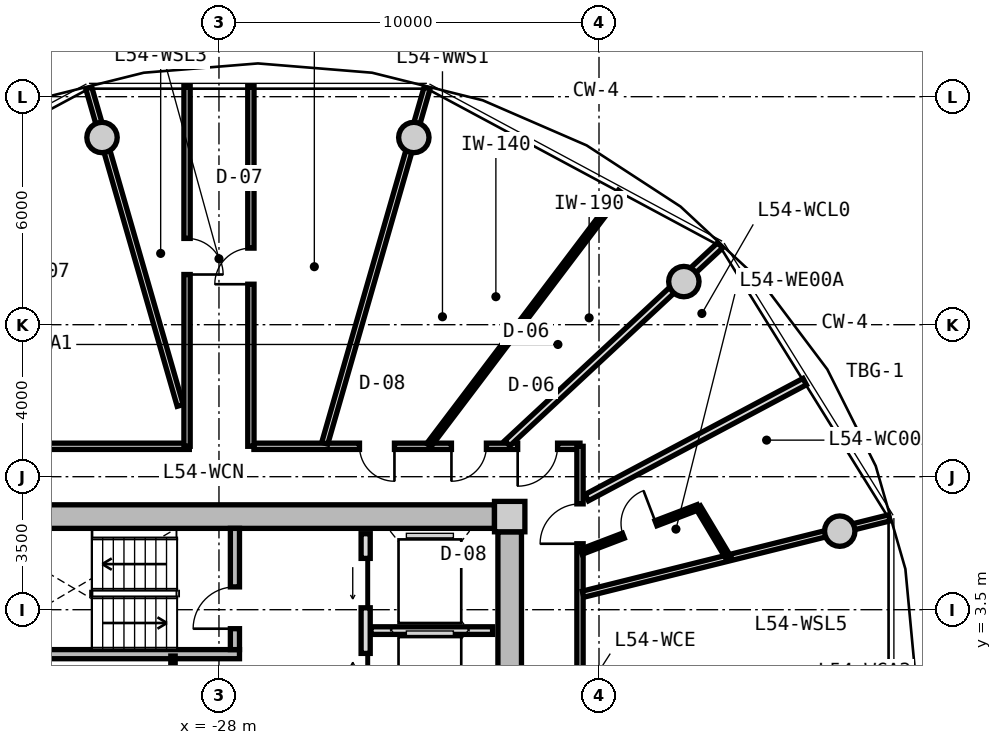
"""IFC4 building model, lengths in metres.
Left out: names, types, materials, properties, quantities, classifications, styles, units other than length and angle.
Written with IfcOpenShell. Run it as: python <this file> out.ifc"""

import sys

from ifc_helpers import new_model, si_unit, direction, frame, frame_2d, origin, origin_2d, place, context, subcontext, project, spatial, rectangle, circle, extrude, source, transform, mapped, element, fill, save


model = new_model("IFC4")
c1 = context("Model", 3, precision=1e-05, world=origin(), true_north=direction((0.0, 1.0)))
c2 = subcontext(c1, "Body", "Model", "MODEL_VIEW")
j1 = project(units=[si_unit("LENGTHUNIT", "METRE"), si_unit("PLANEANGLEUNIT", "RADIAN")], contexts=[c1])
p1 = place(None, origin())
s1 = spatial("IfcSite", under=j1, at=p1, CompositionType="ELEMENT")
p2 = place(p1, origin())
s2 = spatial("IfcBuilding", under=s1, at=p2, CompositionType="ELEMENT")
p3 = place(p2, frame((0.0, 0.0, 173.95)))
s3 = spatial("IfcBuildingStorey", under=s2, at=p3, CompositionType="ELEMENT", Elevation=173.95)
m1 = source(origin(), c2, "Body", "SweptSolid", [
    extrude(rectangle(XDim=0.8, YDim=0.8, at=origin_2d()), origin(), (0.0, 0.0, 1.0), 3.05),
])
p4 = place(p3, frame((-20.35, 5.95, 0.0), z_axis=(0.0, 0.0, 1.0), x_axis=(1.0, 0.0, 0.0)))
e1 = element("IfcColumn", 1, at=p4, inside=s3, PredefinedType="COLUMN", context=c2, shape_type="MappedRepresentation", body=[
    mapped(m1, transform((0.0, 0.0, 0.0), x_axis=(1.0, 0.0, 0.0), y_axis=(0.0, 1.0, 0.0), z_axis=(0.0, 0.0, 1.0), scale=1.0)),
])
m2 = source(origin(), c2, "Body", "SweptSolid", [
    extrude(rectangle(XDim=14.5, YDim=0.62, at=frame_2d((7.25, 0.0))), origin(), (0.0, 0.0, 1.0), 2.81),
])
p5 = place(p3, frame((-35.25, 5.95, 0.0), z_axis=(0.0, 0.0, 1.0), x_axis=(1.0, 0.0, 0.0)))
e2 = element("IfcWall", 2, at=p5, inside=s3, PredefinedType="SHEAR", context=c2, shape_type="MappedRepresentation", body=[
    mapped(m2, transform((0.0, 0.0, 0.0), x_axis=(1.0, 0.0, 0.0), y_axis=(0.0, 1.0, 0.0), z_axis=(0.0, 0.0, 1.0), scale=1.0)),
])
m3 = source(origin(), c2, "Body", "SweptSolid", [
    extrude(rectangle(XDim=11.1, YDim=0.62, at=frame_2d((5.55, 0.0))), origin(), (0.0, 0.0, 1.0), 2.81),
])
p6 = place(p3, frame((-20.35, 5.55, 0.0), z_axis=(0.0, 0.0, 1.0), x_axis=(0.0, -1.0, 0.0)))
e3 = element("IfcWall", 3, at=p6, inside=s3, PredefinedType="SHEAR", context=c2, shape_type="MappedRepresentation", body=[
    mapped(m3, transform((0.0, 0.0, 0.0), x_axis=(1.0, 0.0, 0.0), y_axis=(0.0, 1.0, 0.0), z_axis=(0.0, 0.0, 1.0), scale=1.0)),
])
p7 = place(p6, frame((5.65, 0.0, 0.0)))
e4 = element("IfcOpeningElement", 4, at=p7, cuts=e3, PredefinedType="OPENING", context=c2, shape_type="SweptSolid", body=[
    extrude(rectangle(XDim=1.2, YDim=2.15, at=frame_2d((0.6, 1.075))), frame((0.0, 0.32, 0.0), z_axis=(0.0, -1.0, 0.0), x_axis=(1.0, 0.0, 0.0)), (0.0, 0.0, 1.0), 0.64),
])
m4 = source(origin(), c2, "Body", "SweptSolid", [
    extrude(circle(Radius=0.4, at=origin_2d()), origin(), (0.0, 0.0, 1.0), 3.05),
])
for number, where, z_axis, x_axis in (
    (5, (-11.665, 5.567, 0.0), (0.0, 0.0, 1.0), (1.0, 0.0, 0.0)),
    (6, (-15.767, 12.135, 0.0), (0.0, 0.0, 1.0), (1.0, 0.0, 0.0)),
    (7, (-22.873, 15.926, 0.0), (0.0, 0.0, 1.0), (1.0, 0.0, 0.0)),
    (8, (-31.077, 15.926, 0.0), (0.0, 0.0, 1.0), (1.0, 0.0, 0.0)),
):
    element("IfcColumn", number, at=place(p3, frame(where, z_axis=z_axis, x_axis=x_axis)), inside=s3, PredefinedType="COLUMN", context=c2, shape_type="MappedRepresentation", body=[
        mapped(m4, transform((0.0, 0.0, 0.0), x_axis=(1.0, 0.0, 0.0), y_axis=(0.0, 1.0, 0.0), z_axis=(0.0, 0.0, 1.0), scale=1.0)),
    ])
m5 = source(origin(), c2, "Body", "SweptSolid", [
    extrude(rectangle(XDim=7.88, YDim=0.24, at=frame_2d((3.94, 0.0))), origin(), (0.0, 0.0, 1.0), 2.81),
])
p8 = place(p3, frame((-35.34, 2.33, 0.0), z_axis=(0.0, 0.0, 1.0), x_axis=(1.0, 0.0, 0.0)))
e9 = element("IfcWall", 9, at=p8, inside=s3, PredefinedType="PARTITIONING", context=c2, shape_type="MappedRepresentation", body=[
    mapped(m5, transform((0.0, 0.0, 0.0), x_axis=(1.0, 0.0, 0.0), y_axis=(0.0, 1.0, 0.0), z_axis=(0.0, 0.0, 1.0), scale=1.0)),
])
m6 = source(origin(), c2, "Body", "SweptSolid", [
    extrude(rectangle(XDim=3.19, YDim=0.24, at=frame_2d((1.595, 0.0))), origin(), (0.0, 0.0, 1.0), 2.81),
])
p9 = place(p3, frame((-27.58, 2.45, 0.0), z_axis=(0.0, 0.0, 1.0), x_axis=(0.0, 1.0, 0.0)))
e10 = element("IfcWall", 10, at=p9, inside=s3, PredefinedType="PARTITIONING", context=c2, shape_type="MappedRepresentation", body=[
    mapped(m6, transform((0.0, 0.0, 0.0), x_axis=(1.0, 0.0, 0.0), y_axis=(0.0, 1.0, 0.0), z_axis=(0.0, 0.0, 1.0), scale=1.0)),
])
p10 = place(p9, frame((0.55, 0.0, 0.0)))
e11 = element("IfcOpeningElement", 11, at=p10, cuts=e10, PredefinedType="OPENING", context=c2, shape_type="SweptSolid", body=[
    extrude(rectangle(XDim=1.1, YDim=2.15, at=frame_2d((0.55, 1.075))), frame((0.0, 0.13, 0.0), z_axis=(0.0, -1.0, 0.0), x_axis=(1.0, 0.0, 0.0)), (0.0, 0.0, 1.0), 0.26),
])
m7 = source(origin(), c2, "Body", "SweptSolid", [
    extrude(rectangle(XDim=5.0, YDim=0.24, at=frame_2d((2.5, 0.0))), origin(), (0.0, 0.0, 1.0), 2.795),
])
p11 = place(p3, frame((-24.14, 0.5, 0.0), z_axis=(0.0, 0.0, 1.0), x_axis=(0.0, 1.0, 0.0)))
e12 = element("IfcWall", 12, at=p11, inside=s3, PredefinedType="PARTITIONING", context=c2, shape_type="MappedRepresentation", body=[
    mapped(m7, transform((0.0, 0.0, 0.0), x_axis=(1.0, 0.0, 0.0), y_axis=(0.0, 1.0, 0.0), z_axis=(0.0, 0.0, 1.0), scale=1.0)),
])
p12 = place(p11, frame((3.05, 0.0, 0.0)))
e13 = element("IfcOpeningElement", 13, at=p12, cuts=e12, PredefinedType="OPENING", context=c2, shape_type="SweptSolid", body=[
    extrude(rectangle(XDim=1.3, YDim=2.2, at=frame_2d((0.65, 1.1))), frame((0.0, 0.13, 0.0), z_axis=(0.0, -1.0, 0.0), x_axis=(1.0, 0.0, 0.0)), (0.0, 0.0, 1.0), 0.26),
])
p13 = place(p11, frame((0.55, 0.0, 0.0)))
e14 = element("IfcOpeningElement", 14, at=p13, cuts=e12, PredefinedType="OPENING", context=c2, shape_type="SweptSolid", body=[
    extrude(rectangle(XDim=1.3, YDim=2.2, at=frame_2d((0.65, 1.1))), frame((0.0, 0.13, 0.0), z_axis=(0.0, -1.0, 0.0), x_axis=(1.0, 0.0, 0.0)), (0.0, 0.0, 1.0), 0.26),
])
m8 = source(origin(), c2, "Body", "SweptSolid", [
    extrude(rectangle(XDim=3.2, YDim=0.2, at=frame_2d((1.6, 0.0))), origin(), (0.0, 0.0, 1.0), 2.795),
])
p14 = place(p3, frame((-24.0, 2.95, 0.0), z_axis=(0.0, 0.0, 1.0), x_axis=(1.0, 0.0, 0.0)))
e15 = element("IfcWall", 15, at=p14, inside=s3, PredefinedType="PARTITIONING", context=c2, shape_type="MappedRepresentation", body=[
    mapped(m8, transform((0.0, 0.0, 0.0), x_axis=(1.0, 0.0, 0.0), y_axis=(0.0, 1.0, 0.0), z_axis=(0.0, 0.0, 1.0), scale=1.0)),
])
m9 = source(origin(), c2, "Body", "SweptSolid", [
    extrude(rectangle(XDim=2.33, YDim=0.115, at=frame_2d((1.165, 0.0))), origin(), (0.0, 0.0, 1.0), 2.795),
])
p15 = place(p3, frame((-29.21, -0.05, 0.0), z_axis=(0.0, 0.0, 1.0), x_axis=(0.0, 1.0, 0.0)))
e16 = element("IfcWall", 16, at=p15, inside=s3, PredefinedType="PARTITIONING", context=c2, shape_type="MappedRepresentation", body=[
    mapped(m9, transform((0.0, 0.0, 0.0), x_axis=(1.0, 0.0, 0.0), y_axis=(0.0, 1.0, 0.0), z_axis=(0.0, 0.0, 1.0), scale=1.0)),
])
m10 = source(origin(), c2, "Body", "SweptSolid", [
    extrude(rectangle(XDim=8.719, YDim=0.165, at=frame_2d((4.36, 0.0))), origin(), (0.0, 0.0, 1.0), 2.795),
])
p16 = place(p3, frame((-37.5, 7.8, 0.0), z_axis=(0.0, 0.0, 1.0), x_axis=(1.0, 0.0, 0.0)))
e17 = element("IfcWall", 17, at=p16, inside=s3, PredefinedType="PARTITIONING", context=c2, shape_type="MappedRepresentation", body=[
    mapped(m10, transform((0.0, 0.0, 0.0), x_axis=(1.0, 0.0, 0.0), y_axis=(0.0, 1.0, 0.0), z_axis=(0.0, 0.0, 1.0), scale=1.0)),
])
p17 = place(p16, frame((3.735, 0.0, 0.0)))
e18 = element("IfcOpeningElement", 18, at=p17, cuts=e17, PredefinedType="OPENING", context=c2, shape_type="SweptSolid", body=[
    extrude(rectangle(XDim=1.25, YDim=2.2, at=frame_2d((0.625, 1.1))), frame((0.0, 0.093, 0.0), z_axis=(0.0, -1.0, 0.0), x_axis=(1.0, 0.0, 0.0)), (0.0, 0.0, 1.0), 0.185),
])
m11 = source(origin(), c2, "Body", "SweptSolid", [
    extrude(rectangle(XDim=8.58, YDim=0.165, at=frame_2d((4.29, 0.0))), origin(), (0.0, 0.0, 1.0), 2.795),
])
p18 = place(p3, frame((-27.08, 7.8, 0.0), z_axis=(0.0, 0.0, 1.0), x_axis=(1.0, 0.0, 0.0)))
e19 = element("IfcWall", 19, at=p18, inside=s3, PredefinedType="PARTITIONING", context=c2, shape_type="MappedRepresentation", body=[
    mapped(m11, transform((0.0, 0.0, 0.0), x_axis=(1.0, 0.0, 0.0), y_axis=(0.0, 1.0, 0.0), z_axis=(0.0, 0.0, 1.0), scale=1.0)),
])
p19 = place(p18, frame((6.94, 0.0, 0.0)))
e20 = element("IfcOpeningElement", 20, at=p19, cuts=e19, PredefinedType="OPENING", context=c2, shape_type="SweptSolid", body=[
    extrude(rectangle(XDim=1.05, YDim=2.15, at=frame_2d((0.525, 1.075))), frame((0.0, 0.093, 0.0), z_axis=(0.0, -1.0, 0.0), x_axis=(1.0, 0.0, 0.0)), (0.0, 0.0, 1.0), 0.185),
])
p20 = place(p18, frame((5.197, 0.0, 0.0)))
e21 = element("IfcOpeningElement", 21, at=p20, cuts=e19, PredefinedType="OPENING", context=c2, shape_type="SweptSolid", body=[
    extrude(rectangle(XDim=0.92, YDim=2.1, at=frame_2d((0.46, 1.05))), frame((0.0, 0.093, 0.0), z_axis=(0.0, -1.0, 0.0), x_axis=(1.0, 0.0, 0.0)), (0.0, 0.0, 1.0), 0.185),
])
p21 = place(p18, frame((2.778, 0.0, 0.0)))
e22 = element("IfcOpeningElement", 22, at=p21, cuts=e19, PredefinedType="OPENING", context=c2, shape_type="SweptSolid", body=[
    extrude(rectangle(XDim=0.92, YDim=2.1, at=frame_2d((0.46, 1.05))), frame((0.0, 0.093, 0.0), z_axis=(0.0, -1.0, 0.0), x_axis=(1.0, 0.0, 0.0)), (0.0, 0.0, 1.0), 0.185),
])
m12 = source(origin(), c2, "Body", "SweptSolid", [
    extrude(rectangle(XDim=6.88, YDim=0.165, at=frame_2d((3.44, 0.0))), origin(), (0.0, 0.0, 1.0), 2.795),
])
p22 = place(p3, frame((-18.5, 7.8, 0.0), z_axis=(0.0, 0.0, 1.0), x_axis=(0.0, -1.0, 0.0)))
e23 = element("IfcWall", 23, at=p22, inside=s3, PredefinedType="PARTITIONING", context=c2, shape_type="MappedRepresentation", body=[
    mapped(m12, transform((0.0, 0.0, 0.0), x_axis=(1.0, 0.0, 0.0), y_axis=(0.0, 1.0, 0.0), z_axis=(0.0, 0.0, 1.0), scale=1.0)),
])
p23 = place(p22, frame((1.515, 0.0, 0.0)))
e24 = element("IfcOpeningElement", 24, at=p23, cuts=e23, PredefinedType="OPENING", context=c2, shape_type="SweptSolid", body=[
    extrude(rectangle(XDim=1.05, YDim=2.15, at=frame_2d((0.525, 1.075))), frame((0.0, 0.093, 0.0), z_axis=(0.0, -1.0, 0.0), x_axis=(1.0, 0.0, 0.0)), (0.0, 0.0, 1.0), 0.185),
])
m13 = source(origin(), c2, "Body", "SweptSolid", [
    extrude(rectangle(XDim=9.73, YDim=0.165, at=frame_2d((4.865, 0.0))), origin(), (0.0, 0.0, 1.0), 2.345),
])
p24 = place(p3, frame((-25.217, 7.88, 0.0), z_axis=(0.0, 0.0, 1.0), x_axis=(0.27679492614, 0.960929013436, 0.0)))
e25 = element("IfcWall", 25, at=p24, inside=s3, PredefinedType="PARTITIONING", context=c2, shape_type="MappedRepresentation", body=[
    mapped(m13, transform((0.0, 0.0, 0.0), x_axis=(1.0, 0.0, 0.0), y_axis=(0.0, 1.0, 0.0), z_axis=(0.0, 0.0, 1.0), scale=1.0)),
])
m14 = source(origin(), c2, "Body", "SweptSolid", [
    extrude(rectangle(XDim=8.695, YDim=0.165, at=frame_2d((4.348, 0.0))), origin(), (0.0, 0.0, 1.0), 2.345),
])
p25 = place(p3, frame((-29.02, 8.875, 0.0), z_axis=(0.0, 0.0, 1.0), x_axis=(-0.276797231892, 0.960928349263, 0.0)))
e26 = element("IfcWall", 26, at=p25, inside=s3, PredefinedType="PARTITIONING", context=c2, shape_type="MappedRepresentation", body=[
    mapped(m14, transform((0.0, 0.0, 0.0), x_axis=(1.0, 0.0, 0.0), y_axis=(0.0, 1.0, 0.0), z_axis=(0.0, 0.0, 1.0), scale=1.0)),
])
m15 = source(origin(), c2, "Body", "SweptSolid", [
    extrude(rectangle(XDim=8.305, YDim=0.165, at=frame_2d((4.153, 0.0))), origin(), (0.0, 0.0, 1.0), 2.345),
])
p26 = place(p3, frame((-18.42, 3.908, 0.0), z_axis=(0.0, 0.0, 1.0), x_axis=(0.970309994378, 0.241864662175, 0.0)))
e27 = element("IfcWall", 27, at=p26, inside=s3, PredefinedType="PARTITIONING", context=c2, shape_type="MappedRepresentation", body=[
    mapped(m15, transform((0.0, 0.0, 0.0), x_axis=(1.0, 0.0, 0.0), y_axis=(0.0, 1.0, 0.0), z_axis=(0.0, 0.0, 1.0), scale=1.0)),
])
m16 = source(origin(), c2, "Body", "SweptSolid", [
    extrude(rectangle(XDim=9.48, YDim=0.165, at=frame_2d((4.74, 0.0))), origin(), (0.0, 0.0, 1.0), 2.795),
])
p27 = place(p3, frame((-28.84, 7.8, 0.0), z_axis=(0.0, 0.0, 1.0), x_axis=(0.0, 1.0, 0.0)))
e28 = element("IfcWall", 28, at=p27, inside=s3, PredefinedType="PARTITIONING", context=c2, shape_type="MappedRepresentation", body=[
    mapped(m16, transform((0.0, 0.0, 0.0), x_axis=(1.0, 0.0, 0.0), y_axis=(0.0, 1.0, 0.0), z_axis=(0.0, 0.0, 1.0), scale=1.0)),
])
p28 = place(p27, frame((4.521, 0.0, 0.0)))
e29 = element("IfcOpeningElement", 29, at=p28, cuts=e28, PredefinedType="OPENING", context=c2, shape_type="SweptSolid", body=[
    extrude(rectangle(XDim=0.95, YDim=2.1, at=frame_2d((0.475, 1.05))), frame((0.0, 0.093, 0.0), z_axis=(0.0, -1.0, 0.0), x_axis=(1.0, 0.0, 0.0)), (0.0, 0.0, 1.0), 0.185),
])
p29 = place(p3, frame((-27.16, 17.28, 0.0), z_axis=(0.0, 0.0, 1.0), x_axis=(0.0, -1.0, 0.0)))
e30 = element("IfcWall", 30, at=p29, inside=s3, PredefinedType="PARTITIONING", context=c2, shape_type="MappedRepresentation", body=[
    mapped(m16, transform((0.0, 0.0, 0.0), x_axis=(1.0, 0.0, 0.0), y_axis=(0.0, 1.0, 0.0), z_axis=(0.0, 0.0, 1.0), scale=1.0)),
])
p30 = place(p29, frame((4.265, 0.0, 0.0)))
e31 = element("IfcOpeningElement", 31, at=p30, cuts=e30, PredefinedType="OPENING", context=c2, shape_type="SweptSolid", body=[
    extrude(rectangle(XDim=0.95, YDim=2.1, at=frame_2d((0.475, 1.05))), frame((0.0, 0.093, 0.0), z_axis=(0.0, -1.0, 0.0), x_axis=(1.0, 0.0, 0.0)), (0.0, 0.0, 1.0), 0.185),
])
m17 = source(origin(), c2, "Body", "SweptSolid", [
    extrude(rectangle(XDim=7.648, YDim=0.19, at=frame_2d((3.824, 0.0))), origin(), (0.0, 0.0, 1.0), 2.345),
])
p31 = place(p3, frame((-20.413, 7.88, 0.0), z_axis=(0.0, 0.0, 1.0), x_axis=(0.732182665826, 0.681108320213, 0.0)))
e32 = element("IfcWall", 32, at=p31, inside=s3, PredefinedType="PARTITIONING", context=c2, shape_type="MappedRepresentation", body=[
    mapped(m17, transform((0.0, 0.0, 0.0), x_axis=(1.0, 0.0, 0.0), y_axis=(0.0, 1.0, 0.0), z_axis=(0.0, 0.0, 1.0), scale=1.0)),
])
m18 = source(origin(), c2, "Body", "SweptSolid", [
    extrude(rectangle(XDim=6.499, YDim=0.19, at=frame_2d((3.25, 0.0))), origin(), (0.0, 0.0, 1.0), 2.795),
])
p32 = place(p3, frame((-18.324, 6.449, 0.0), z_axis=(0.0, 0.0, 1.0), x_axis=(0.882715595921, 0.469907625729, 0.0)))
e33 = element("IfcWall", 33, at=p32, inside=s3, PredefinedType="PARTITIONING", context=c2, shape_type="MappedRepresentation", body=[
    mapped(m18, transform((0.0, 0.0, 0.0), x_axis=(1.0, 0.0, 0.0), y_axis=(0.0, 1.0, 0.0), z_axis=(0.0, 0.0, 1.0), scale=1.0)),
])
m19 = source(origin(), c2, "Body", "SweptSolid", [
    extrude(rectangle(XDim=3.295, YDim=0.14, at=frame_2d((1.647, 0.0))), origin(), (0.0, 0.0, 1.0), 2.795),
])
p33 = place(p3, frame((-18.47, 5.023, 0.0), z_axis=(0.0, 0.0, 1.0), x_axis=(0.934202224769, 0.356743890258, 0.0)))
e34 = element("IfcWall", 34, at=p33, inside=s3, PredefinedType="PARTITIONING", context=c2, shape_type="MappedRepresentation", body=[
    mapped(m19, transform((0.0, 0.0, 0.0), x_axis=(1.0, 0.0, 0.0), y_axis=(0.0, 1.0, 0.0), z_axis=(0.0, 0.0, 1.0), scale=1.0)),
])
p34 = place(p33, frame((1.188, 0.0, 0.0)))
e35 = element("IfcOpeningElement", 35, at=p34, cuts=e34, PredefinedType="OPENING", context=c2, shape_type="SweptSolid", body=[
    extrude(rectangle(XDim=0.92, YDim=2.1, at=frame_2d((0.46, 1.05))), frame((0.0, 0.08, 0.0), z_axis=(0.0, -1.0, 0.0), x_axis=(1.0, 0.0, 0.0)), (0.0, 0.0, 1.0), 0.16),
])
m20 = source(origin(), c2, "Body", "SweptSolid", [
    extrude(rectangle(XDim=1.558, YDim=0.14, at=frame_2d((0.779, 0.0))), origin(), (0.0, 0.0, 1.0), 2.795),
])
p35 = place(p3, frame((-15.392, 6.198, 0.0), z_axis=(0.0, 0.0, 1.0), x_axis=(0.513735221728, -0.85794878749, 0.0)))
e36 = element("IfcWall", 36, at=p35, inside=s3, PredefinedType="PARTITIONING", context=c2, shape_type="MappedRepresentation", body=[
    mapped(m20, transform((0.0, 0.0, 0.0), x_axis=(1.0, 0.0, 0.0), y_axis=(0.0, 1.0, 0.0), z_axis=(0.0, 0.0, 1.0), scale=1.0)),
])
m21 = source(origin(), c2, "Body", "SweptSolid", [
    extrude(rectangle(XDim=8.359, YDim=0.14, at=frame_2d((4.18, 0.0))), origin(), (0.0, 0.0, 1.0), 2.795),
])
p36 = place(p3, frame((-22.477, 7.83, 0.0), z_axis=(0.0, 0.0, 1.0), x_axis=(0.603265985309, 0.797540062297, 0.0)))
e37 = element("IfcWall", 37, at=p36, inside=s3, PredefinedType="PARTITIONING", context=c2, shape_type="MappedRepresentation", body=[
    mapped(m21, transform((0.0, 0.0, 0.0), x_axis=(1.0, 0.0, 0.0), y_axis=(0.0, 1.0, 0.0), z_axis=(0.0, 0.0, 1.0), scale=1.0)),
])
m22 = source(origin(), c2, "Body", "SweptSolid", [
    extrude(rectangle(XDim=1.1, YDim=2.15, at=frame_2d((0.55, 1.075))), frame((0.0, 0.025, 0.0), z_axis=(0.0, -1.0, 0.0), x_axis=(1.0, 0.0, 0.0)), (0.0, 0.0, 1.0), 0.05),
])
p37 = place(p10, origin())
e38 = element("IfcDoor", 38, at=p37, inside=s3, OperationType="SINGLE_SWING_LEFT", PredefinedType="DOOR", context=c2, shape_type="MappedRepresentation", body=[
    mapped(m22, transform((0.0, 0.0, 0.0), x_axis=(1.0, 0.0, 0.0), y_axis=(0.0, 1.0, 0.0), z_axis=(0.0, 0.0, 1.0), scale=1.0)),
])
fill(e11, e38)
m23 = source(origin(), c2, "Body", "SweptSolid", [
    extrude(rectangle(XDim=1.3, YDim=2.2, at=frame_2d((0.65, 1.1))), frame((0.0, 0.025, 0.0), z_axis=(0.0, -1.0, 0.0), x_axis=(1.0, 0.0, 0.0)), (0.0, 0.0, 1.0), 0.05),
])
p38 = place(p12, origin())
e39 = element("IfcDoor", 39, at=p38, inside=s3, OperationType="SLIDING_TO_LEFT", PredefinedType="DOOR", context=c2, shape_type="MappedRepresentation", body=[
    mapped(m23, transform((0.0, 0.0, 0.0), x_axis=(1.0, 0.0, 0.0), y_axis=(0.0, 1.0, 0.0), z_axis=(0.0, 0.0, 1.0), scale=1.0)),
])
fill(e13, e39)
p39 = place(p13, origin())
e40 = element("IfcDoor", 40, at=p39, inside=s3, OperationType="SLIDING_TO_RIGHT", PredefinedType="DOOR", context=c2, shape_type="MappedRepresentation", body=[
    mapped(m23, transform((0.0, 0.0, 0.0), x_axis=(1.0, 0.0, 0.0), y_axis=(0.0, 1.0, 0.0), z_axis=(0.0, 0.0, 1.0), scale=1.0)),
])
fill(e14, e40)
m24 = source(origin(), c2, "Body", "SweptSolid", [
    extrude(rectangle(XDim=0.95, YDim=2.1, at=frame_2d((0.475, 1.05))), frame((0.0, 0.025, 0.0), z_axis=(0.0, -1.0, 0.0), x_axis=(1.0, 0.0, 0.0)), (0.0, 0.0, 1.0), 0.05),
])
p40 = place(p28, frame((0.95, 0.0, 0.0), z_axis=(0.0, 0.0, 1.0), x_axis=(-1.0, 0.0, 0.0)))
e41 = element("IfcDoor", 41, at=p40, inside=s3, OperationType="SINGLE_SWING_RIGHT", PredefinedType="DOOR", context=c2, shape_type="MappedRepresentation", body=[
    mapped(m24, transform((0.0, 0.0, 0.0), x_axis=(1.0, 0.0, 0.0), y_axis=(0.0, 1.0, 0.0), z_axis=(0.0, 0.0, 1.0), scale=1.0)),
])
fill(e29, e41)
p41 = place(p30, frame((0.95, 0.0, 0.0), z_axis=(0.0, 0.0, 1.0), x_axis=(-1.0, 0.0, 0.0)))
e42 = element("IfcDoor", 42, at=p41, inside=s3, OperationType="SINGLE_SWING_LEFT", PredefinedType="DOOR", context=c2, shape_type="MappedRepresentation", body=[
    mapped(m24, transform((0.0, 0.0, 0.0), x_axis=(1.0, 0.0, 0.0), y_axis=(0.0, 1.0, 0.0), z_axis=(0.0, 0.0, 1.0), scale=1.0)),
])
fill(e31, e42)
m25 = source(origin(), c2, "Body", "SweptSolid", [
    extrude(rectangle(XDim=1.05, YDim=2.15, at=frame_2d((0.525, 1.075))), frame((0.0, 0.025, 0.0), z_axis=(0.0, -1.0, 0.0), x_axis=(1.0, 0.0, 0.0)), (0.0, 0.0, 1.0), 0.05),
])
p42 = place(p23, frame((1.05, 0.0, 0.0), z_axis=(0.0, 0.0, 1.0), x_axis=(-1.0, 0.0, 0.0)))
e43 = element("IfcDoor", 43, at=p42, inside=s3, OperationType="SINGLE_SWING_LEFT", PredefinedType="DOOR", context=c2, shape_type="MappedRepresentation", body=[
    mapped(m25, transform((0.0, 0.0, 0.0), x_axis=(1.0, 0.0, 0.0), y_axis=(0.0, 1.0, 0.0), z_axis=(0.0, 0.0, 1.0), scale=1.0)),
])
fill(e24, e43)
m26 = source(origin(), c2, "Body", "SweptSolid", [
    extrude(rectangle(XDim=0.92, YDim=2.1, at=frame_2d((0.46, 1.05))), frame((0.0, 0.025, 0.0), z_axis=(0.0, -1.0, 0.0), x_axis=(1.0, 0.0, 0.0)), (0.0, 0.0, 1.0), 0.05),
])
p43 = place(p34, origin())
e44 = element("IfcDoor", 44, at=p43, inside=s3, OperationType="SINGLE_SWING_RIGHT", PredefinedType="DOOR", context=c2, shape_type="MappedRepresentation", body=[
    mapped(m26, transform((0.0, 0.0, 0.0), x_axis=(1.0, 0.0, 0.0), y_axis=(0.0, 1.0, 0.0), z_axis=(0.0, 0.0, 1.0), scale=1.0)),
])
fill(e35, e44)
p44 = place(p19, frame((1.05, 0.0, 0.0), z_axis=(0.0, 0.0, 1.0), x_axis=(-1.0, 0.0, 0.0)))
e45 = element("IfcDoor", 45, at=p44, inside=s3, OperationType="SINGLE_SWING_RIGHT", PredefinedType="DOOR", context=c2, shape_type="MappedRepresentation", body=[
    mapped(m25, transform((0.0, 0.0, 0.0), x_axis=(1.0, 0.0, 0.0), y_axis=(0.0, 1.0, 0.0), z_axis=(0.0, 0.0, 1.0), scale=1.0)),
])
fill(e20, e45)
p45 = place(p20, frame((0.92, 0.0, 0.0), z_axis=(0.0, 0.0, 1.0), x_axis=(-1.0, 0.0, 0.0)))
e46 = element("IfcDoor", 46, at=p45, inside=s3, OperationType="SINGLE_SWING_RIGHT", PredefinedType="DOOR", context=c2, shape_type="MappedRepresentation", body=[
    mapped(m26, transform((0.0, 0.0, 0.0), x_axis=(1.0, 0.0, 0.0), y_axis=(0.0, 1.0, 0.0), z_axis=(0.0, 0.0, 1.0), scale=1.0)),
])
fill(e21, e46)
p46 = place(p21, frame((0.92, 0.0, 0.0), z_axis=(0.0, 0.0, 1.0), x_axis=(-1.0, 0.0, 0.0)))
e47 = element("IfcDoor", 47, at=p46, inside=s3, OperationType="SINGLE_SWING_LEFT", PredefinedType="DOOR", context=c2, shape_type="MappedRepresentation", body=[
    mapped(m26, transform((0.0, 0.0, 0.0), x_axis=(1.0, 0.0, 0.0), y_axis=(0.0, 1.0, 0.0), z_axis=(0.0, 0.0, 1.0), scale=1.0)),
])
fill(e22, e47)
save(model, sys.argv[1])
